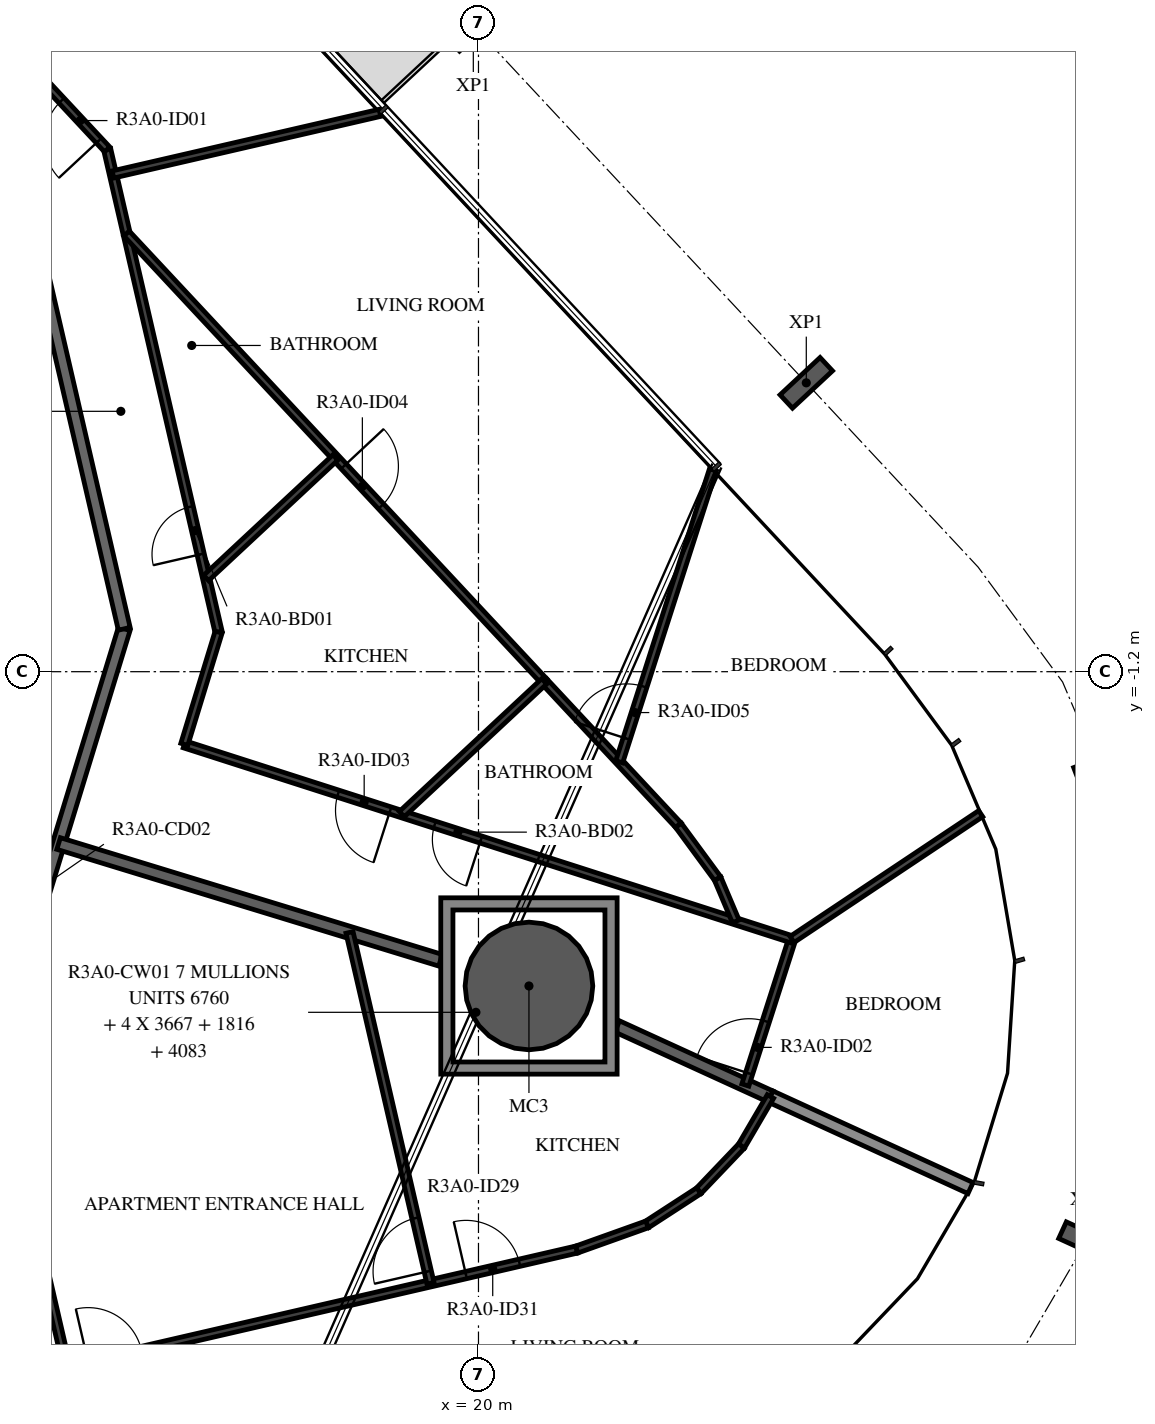
"""IFC4 building model, lengths in metres.
Left out: names, types, materials, properties, quantities, classifications, styles, units other than length and angle.
Written with IfcOpenShell. Run it as: python <this file> out.ifc"""

import sys

from ifc_helpers import new_model, si_unit, direction, frame, frame_2d, origin, origin_2d, place, context, subcontext, project, spatial, polyline, rectangle, hollow_circle, i_section, outline, extrude, element, fill, save


model = new_model("IFC4")
c1 = context("Model", 3, precision=1e-05, world=origin(), true_north=direction((0.0, 1.0)))
c2 = subcontext(c1, "Body", "Model", "MODEL_VIEW")
j1 = project(units=[si_unit("LENGTHUNIT", "METRE"), si_unit("PLANEANGLEUNIT", "RADIAN")], contexts=[c1])
p1 = place(None, origin())
s1 = spatial("IfcSite", under=j1, at=p1, CompositionType="ELEMENT")
p2 = place(p1, origin())
s2 = spatial("IfcBuilding", under=s1, at=p2, CompositionType="ELEMENT")
p3 = place(p2, frame((0.0, 0.0, 120.4)))
s3 = spatial("IfcBuildingStorey", under=s2, at=p3, CompositionType="ELEMENT", Elevation=120.4)
p4 = place(p3, frame((20.83, -6.368, -0.38), z_axis=(0.0, 0.0, 1.0), x_axis=(1.0, 0.0, 0.0)))
e1 = element("IfcColumn", 1, at=p4, inside=s3, PredefinedType="COLUMN", context=c2, shape_type="SweptSolid", body=[
    extrude(hollow_circle(Radius=1.05, WallThickness=0.05, at=origin_2d()), origin(), (0.0, 0.0, 1.0), 3.5),
])
for number, where, z_axis, x_axis in (
    (2, (30.014, -10.571, -0.38), (0.0, 0.0, 1.0), (-0.416, -0.909, 0.0)),
    (3, (30.262, -2.756, -0.38), (0.0, 0.0, 1.0), (0.358, -0.934, 0.0)),
    (4, (25.391, 3.55, -0.38), (0.0, 0.0, 1.0), (0.682, -0.731, 0.0)),
):
    element("IfcColumn", number, at=place(p3, frame(where, z_axis=z_axis, x_axis=x_axis)), inside=s3, PredefinedType="COLUMN", context=c2, shape_type="SweptSolid", body=[
        extrude(i_section(OverallWidth=0.3, OverallDepth=0.9, WebThickness=0.019, FlangeThickness=0.035, FilletRadius=0.03, at=origin_2d()), origin(), (0.0, 0.0, 1.0), 3.5),
    ])
p5 = place(p3, frame((12.028, -7.516, 0.0), z_axis=(0.0, 0.0, 1.0), x_axis=(0.292365533182, 0.956306642771, 0.0)))
e5 = element("IfcWall", 5, at=p5, inside=s3, PredefinedType="STANDARD", context=c2, shape_type="SweptSolid", body=[
    extrude(rectangle(XDim=7.342, YDim=0.2, at=frame_2d((3.671, 0.0))), origin(), (0.0, 0.0, 1.0), 3.12),
])
p6 = place(p3, frame((14.175, -0.495, 0.0), z_axis=(0.0, 0.0, 1.0), x_axis=(-0.224922649383, 0.974376622151, 0.0)))
e6 = element("IfcWall", 6, at=p6, inside=s3, PredefinedType="STANDARD", context=c2, shape_type="SweptSolid", body=[
    extrude(rectangle(XDim=7.342, YDim=0.2, at=frame_2d((3.671, 0.0))), origin(), (0.0, 0.0, 1.0), 3.12),
])
p7 = place(p3, frame((13.095, -4.026, 0.0), z_axis=(0.0, 0.0, 1.0), x_axis=(0.956303942966, -0.292374363904, 0.0)))
e7 = element("IfcWall", 7, at=p7, inside=s3, PredefinedType="STANDARD", context=c2, shape_type="SweptSolid", body=[
    extrude(rectangle(XDim=6.567, YDim=0.2, at=frame_2d((3.284, 0.0))), origin(), (0.0, 0.0, 1.0), 3.12),
])
p8 = place(p3, frame((22.28, -7.033, 0.0), z_axis=(0.0, 0.0, 1.0), x_axis=(0.909468768003, -0.415772245378, 0.0)))
e8 = element("IfcWall", 8, at=p8, inside=s3, PredefinedType="STANDARD", context=c2, shape_type="SweptSolid", body=[
    extrude(rectangle(XDim=2.773, YDim=0.2, at=frame_2d((1.386, 0.0))), origin(), (0.0, 0.0, 1.0), 3.12),
])
p9 = place(p3, frame((24.802, -8.186, 0.0), z_axis=(0.0, 0.0, 1.0), x_axis=(0.909307466213, -0.416124899387, 0.0)))
e9 = element("IfcWall", 9, at=p9, inside=s3, PredefinedType="STANDARD", context=c2, shape_type="SweptSolid", body=[
    extrude(rectangle(XDim=3.618, YDim=0.2, at=frame_2d((1.809, 0.0))), origin(), (0.0, 0.0, 1.0), 2.73),
])
p10 = place(p3, frame((15.727, -0.549, 0.0), z_axis=(0.0, 0.0, 1.0), x_axis=(-0.22493611855, 0.974373512864, 0.0)))
e10 = element("IfcWall", 10, at=p10, inside=s3, PredefinedType="PARTITIONING", context=c2, shape_type="SweptSolid", body=[
    extrude(rectangle(XDim=8.146, YDim=0.12, at=frame_2d((4.073, 0.0))), origin(), (0.0, 0.0, 1.0), 3.12),
])
p11 = place(p10, frame((1.314, 0.0, 0.0)))
e11 = element("IfcOpeningElement", 11, at=p11, cuts=e10, PredefinedType="OPENING", context=c2, shape_type="SweptSolid", body=[
    extrude(rectangle(XDim=0.8, YDim=2.1, at=frame_2d((0.4, 1.05))), frame((0.0, 0.07, 0.0), z_axis=(0.0, -1.0, 0.0), x_axis=(1.0, 0.0, 0.0)), (0.0, 0.0, 1.0), 0.14),
])
p12 = place(p3, frame((13.894, 7.388, 0.0), z_axis=(0.0, 0.0, 1.0), x_axis=(-0.681994622729, 0.731357186721, 0.0)))
e12 = element("IfcWall", 12, at=p12, inside=s3, PredefinedType="PARTITIONING", context=c2, shape_type="SweptSolid", body=[
    extrude(rectangle(XDim=8.146, YDim=0.12, at=frame_2d((4.073, 0.0))), origin(), (0.0, 0.0, 1.0), 3.12),
])
p13 = place(p12, frame((0.2, 0.0, 0.0)))
e13 = element("IfcOpeningElement", 13, at=p13, cuts=e12, PredefinedType="OPENING", context=c2, shape_type="SweptSolid", body=[
    extrude(rectangle(XDim=0.9, YDim=2.1, at=frame_2d((0.45, 1.05))), frame((0.0, 0.07, 0.0), z_axis=(0.0, -1.0, 0.0), x_axis=(1.0, 0.0, 0.0)), (0.0, 0.0, 1.0), 0.14),
])
p14 = place(p3, frame((24.389, -7.997, 0.0), z_axis=(0.0, 0.0, 1.0), x_axis=(0.305723184389, 0.952120441188, 0.0)))
e14 = element("IfcWall", 14, at=p14, inside=s3, PredefinedType="PARTITIONING", context=c2, shape_type="SweptSolid", body=[
    extrude(rectangle(XDim=2.515, YDim=0.12, at=frame_2d((1.257, 0.0))), origin(), (0.0, 0.0, 1.0), 3.12),
])
p15 = place(p14, frame((0.2, 0.0, 0.0)))
e15 = element("IfcOpeningElement", 15, at=p15, cuts=e14, PredefinedType="OPENING", context=c2, shape_type="SweptSolid", body=[
    extrude(rectangle(XDim=0.9, YDim=2.1, at=frame_2d((0.45, 1.05))), frame((0.0, 0.07, 0.0), z_axis=(0.0, -1.0, 0.0), x_axis=(1.0, 0.0, 0.0)), (0.0, 0.0, 1.0), 0.14),
])
p16 = place(p3, frame((25.158, -5.603, 0.0), z_axis=(0.0, 0.0, 1.0), x_axis=(-0.952147783118, 0.305638019729, 0.0)))
e16 = element("IfcWall", 16, at=p16, inside=s3, PredefinedType="PARTITIONING", context=c2, shape_type="SweptSolid", body=[
    extrude(rectangle(XDim=10.498, YDim=0.12, at=frame_2d((5.249, 0.0))), origin(), (0.0, 0.0, 1.0), 3.12),
])
p17 = place(p16, frame((5.373, 0.0, 0.0)))
e17 = element("IfcOpeningElement", 17, at=p17, cuts=e16, PredefinedType="OPENING", context=c2, shape_type="SweptSolid", body=[
    extrude(rectangle(XDim=0.8, YDim=2.1, at=frame_2d((0.4, 1.05))), frame((0.0, 0.07, 0.0), z_axis=(0.0, -1.0, 0.0), x_axis=(1.0, 0.0, 0.0)), (0.0, 0.0, 1.0), 0.14),
])
p18 = place(p16, frame((6.941, 0.0, 0.0)))
e18 = element("IfcOpeningElement", 18, at=p18, cuts=e16, PredefinedType="OPENING", context=c2, shape_type="SweptSolid", body=[
    extrude(rectangle(XDim=0.9, YDim=2.1, at=frame_2d((0.45, 1.05))), frame((0.0, 0.07, 0.0), z_axis=(0.0, -1.0, 0.0), x_axis=(1.0, 0.0, 0.0)), (0.0, 0.0, 1.0), 0.14),
])
p19 = place(p3, frame((15.162, -2.395, 0.0), z_axis=(0.0, 0.0, 1.0), x_axis=(0.292404972776, 0.956294584266, 0.0)))
e19 = element("IfcWall", 19, at=p19, inside=s3, PredefinedType="PARTITIONING", context=c2, shape_type="SweptSolid", body=[
    extrude(rectangle(XDim=1.929, YDim=0.12, at=frame_2d((0.965, 0.0))), origin(), (0.0, 0.0, 1.0), 3.12),
])
p20 = place(p3, frame((14.213, 6.006, 0.0), z_axis=(0.0, 0.0, 1.0), x_axis=(0.681982148724, -0.731368818601, 0.0)))
e20 = element("IfcWall", 20, at=p20, inside=s3, PredefinedType="PARTITIONING", context=c2, shape_type="SweptSolid", body=[
    extrude(rectangle(XDim=10.07, YDim=0.12, at=frame_2d((5.035, 0.0))), origin(), (0.0, 0.0, 1.0), 3.12),
])
p21 = place(p20, frame((5.235, 0.0, 0.0)))
e21 = element("IfcOpeningElement", 21, at=p21, cuts=e20, PredefinedType="OPENING", context=c2, shape_type="SweptSolid", body=[
    extrude(rectangle(XDim=0.9, YDim=2.1, at=frame_2d((0.45, 1.05))), frame((0.0, 0.07, 0.0), z_axis=(0.0, -1.0, 0.0), x_axis=(1.0, 0.0, 0.0)), (0.0, 0.0, 1.0), 0.14),
])
p22 = place(p3, frame((18.379, 7.99, 0.0), z_axis=(0.0, 0.0, 1.0), x_axis=(-0.974372926515, -0.224938658471, 0.0)))
e22 = element("IfcWall", 22, at=p22, inside=s3, PredefinedType="PARTITIONING", context=c2, shape_type="SweptSolid", body=[
    extrude(rectangle(XDim=4.505, YDim=0.12, at=frame_2d((2.253, 0.0))), origin(), (0.0, 0.0, 1.0), 3.12),
])
p23 = place(p3, frame((21.081, -1.359, 0.0), z_axis=(0.0, 0.0, 1.0), x_axis=(0.682046729342, -0.731308593545, 0.0)))
e23 = element("IfcWall", 23, at=p23, inside=s3, PredefinedType="PARTITIONING", context=c2, shape_type="SweptSolid", body=[
    extrude(rectangle(XDim=3.236, YDim=0.12, at=frame_2d((1.618, 0.0))), origin(), (0.0, 0.0, 1.0), 3.12),
])
p24 = place(p3, frame((22.314, -2.681, 0.0), z_axis=(0.0, 0.0, 1.0), x_axis=(0.305629733216, 0.952150443036, 0.0)))
e24 = element("IfcWall", 24, at=p24, inside=s3, PredefinedType="PARTITIONING", context=c2, shape_type="SweptSolid", body=[
    extrude(rectangle(XDim=5.041, YDim=0.12, at=frame_2d((2.52, 0.0))), origin(), (0.0, 0.0, 1.0), 3.12),
])
p25 = place(p24, frame((0.4, 0.0, 0.0)))
e25 = element("IfcOpeningElement", 25, at=p25, cuts=e24, PredefinedType="OPENING", context=c2, shape_type="SweptSolid", body=[
    extrude(rectangle(XDim=0.9, YDim=2.1, at=frame_2d((0.45, 1.05))), frame((0.0, 0.07, 0.0), z_axis=(0.0, -1.0, 0.0), x_axis=(1.0, 0.0, 0.0)), (0.0, 0.0, 1.0), 0.14),
])
p26 = place(p3, frame((15.521, 0.341, 0.0), z_axis=(0.0, 0.0, 1.0), x_axis=(0.73140706136, 0.681941134257, 0.0)))
e26 = element("IfcWall", 26, at=p26, inside=s3, PredefinedType="PARTITIONING", context=c2, shape_type="SweptSolid", body=[
    extrude(rectangle(XDim=2.907, YDim=0.12, at=frame_2d((1.454, 0.0))), origin(), (0.0, 0.0, 1.0), 3.12),
])
p27 = place(p3, frame((28.259, -3.535, 0.0), z_axis=(0.0, 0.0, 1.0), x_axis=(-0.831969683957, -0.554821092765, 0.0)))
e27 = element("IfcWall", 27, at=p27, inside=s3, PredefinedType="PARTITIONING", context=c2, shape_type="SweptSolid", body=[
    extrude(rectangle(XDim=3.728, YDim=0.12, at=frame_2d((1.864, 0.0))), origin(), (0.0, 0.0, 1.0), 2.73),
])
p28 = place(p3, frame((24.231, -5.306, 0.0), z_axis=(0.0, 0.0, 1.0), x_axis=(-0.390836600732, 0.92046007601, 0.0)))
e28 = element("IfcWall", 28, at=p28, inside=s3, PredefinedType="PARTITIONING", context=c2, shape_type="SweptSolid", body=[
    extrude(rectangle(XDim=0.765, YDim=0.12, at=frame_2d((0.383, 0.0))), origin(), (0.0, 0.0, 1.0), 3.12),
])
p29 = place(p3, frame((23.932, -4.601, 0.0), z_axis=(0.0, 0.0, 1.0), x_axis=(-0.592463335142, 0.805597415904, 0.0)))
e29 = element("IfcWall", 29, at=p29, inside=s3, PredefinedType="PARTITIONING", context=c2, shape_type="SweptSolid", body=[
    extrude(rectangle(XDim=1.087, YDim=0.12, at=frame_2d((0.543, 0.0))), origin(), (0.0, 0.0, 1.0), 3.12),
])
p30 = place(p3, frame((21.081, -1.359, 0.0), z_axis=(0.0, 0.0, 1.0), x_axis=(-0.731341711004, -0.682011218196, 0.0)))
e30 = element("IfcWall", 30, at=p30, inside=s3, PredefinedType="PARTITIONING", context=c2, shape_type="SweptSolid", body=[
    extrude(rectangle(XDim=3.202, YDim=0.12, at=frame_2d((1.601, 0.0))), origin(), (0.0, 0.0, 1.0), 3.12),
])
p31 = place(p3, frame((12.434, -9.189, 0.0), z_axis=(0.0, 0.0, 1.0), x_axis=(0.224924972887, -0.974376085796, 0.0)))
e31 = element("IfcWall", 31, at=p31, inside=s3, PredefinedType="PARTITIONING", context=c2, shape_type="SweptSolid", body=[
    extrude(rectangle(XDim=3.541, YDim=0.12, at=frame_2d((1.771, 0.0))), origin(), (0.0, 0.0, 1.0), 3.12),
])
p32 = place(p3, frame((7.312, -14.005, 0.0), z_axis=(0.0, 0.0, 1.0), x_axis=(0.974367924791, 0.224960323474, 0.0)))
e32 = element("IfcWall", 32, at=p32, inside=s3, PredefinedType="PARTITIONING", context=c2, shape_type="SweptSolid", body=[
    extrude(rectangle(XDim=14.679, YDim=0.12, at=frame_2d((7.34, 0.0))), origin(), (0.0, 0.0, 1.0), 3.12),
])
p33 = place(p32, frame((6.433, 0.0, 0.0)))
e33 = element("IfcOpeningElement", 33, at=p33, cuts=e32, PredefinedType="OPENING", context=c2, shape_type="SweptSolid", body=[
    extrude(rectangle(XDim=0.9, YDim=2.1, at=frame_2d((0.45, 1.05))), frame((0.0, 0.07, 0.0), z_axis=(0.0, -1.0, 0.0), x_axis=(1.0, 0.0, 0.0)), (0.0, 0.0, 1.0), 0.14),
])
p34 = place(p32, frame((12.812, 0.0, 0.0)))
e34 = element("IfcOpeningElement", 34, at=p34, cuts=e32, PredefinedType="OPENING", context=c2, shape_type="SweptSolid", body=[
    extrude(rectangle(XDim=0.9, YDim=2.1, at=frame_2d((0.45, 1.05))), frame((0.0, 0.07, 0.0), z_axis=(0.0, -1.0, 0.0), x_axis=(1.0, 0.0, 0.0)), (0.0, 0.0, 1.0), 0.14),
])
p35 = place(p3, frame((19.211, -11.258, 0.0), z_axis=(0.0, 0.0, 1.0), x_axis=(-0.22499500936, 0.974359915926, 0.0)))
e35 = element("IfcWall", 35, at=p35, inside=s3, PredefinedType="PARTITIONING", context=c2, shape_type="SweptSolid", body=[
    extrude(rectangle(XDim=5.921, YDim=0.12, at=frame_2d((2.961, 0.0))), origin(), (0.0, 0.0, 1.0), 3.12),
])
p36 = place(p35, frame((0.2, 0.0, 0.0)))
e36 = element("IfcOpeningElement", 36, at=p36, cuts=e35, PredefinedType="OPENING", context=c2, shape_type="SweptSolid", body=[
    extrude(rectangle(XDim=0.9, YDim=2.1, at=frame_2d((0.45, 1.05))), frame((0.0, 0.07, 0.0), z_axis=(0.0, -1.0, 0.0), x_axis=(1.0, 0.0, 0.0)), (0.0, 0.0, 1.0), 0.14),
])
p37 = place(p3, frame((24.802, -8.186, 0.0), z_axis=(0.0, 0.0, 1.0), x_axis=(-0.505043103481, -0.863094122113, 0.0)))
e37 = element("IfcWall", 37, at=p37, inside=s3, PredefinedType="PARTITIONING", context=c2, shape_type="SweptSolid", body=[
    extrude(rectangle(XDim=0.945, YDim=0.12, at=frame_2d((0.473, 0.0))), origin(), (0.0, 0.0, 1.0), 3.12),
])
for number, where, z_axis, x_axis in (
    (38, (24.324, -9.002, 0.0), (0.0, 0.0, 1.0), (-0.69, -0.723, 0.0)),
    (39, (23.623, -9.737, 0.0), (0.0, 0.0, 1.0), (-0.839, -0.545, 0.0)),
):
    element("IfcWall", number, at=place(p3, frame(where, z_axis=z_axis, x_axis=x_axis)), inside=s3, PredefinedType="PARTITIONING", context=c2, shape_type="SweptSolid", body=[
        extrude(rectangle(XDim=1.016, YDim=0.12, at=frame_2d((0.508, 0.0))), origin(), (0.0, 0.0, 1.0), 3.12),
    ])
p38 = place(p3, frame((22.771, -10.29, 0.0), z_axis=(0.0, 0.0, 1.0), x_axis=(-0.941701391526, -0.336449831623, 0.0)))
e40 = element("IfcWall", 40, at=p38, inside=s3, PredefinedType="PARTITIONING", context=c2, shape_type="SweptSolid", body=[
    extrude(rectangle(XDim=1.227, YDim=0.12, at=frame_2d((0.614, 0.0))), origin(), (0.0, 0.0, 1.0), 3.12),
])
p39 = place(p3, origin())
e41 = element("IfcWall", 41, at=p39, inside=s3, PredefinedType="STANDARD", context=c2, shape_type="SweptSolid", body=[
    extrude(outline(polyline([(22.28, -4.918), (22.28, -7.818), (19.38, -7.818), (19.38, -4.918), (22.28, -4.918)]), holes=[polyline([(19.58, -7.618), (22.08, -7.618), (22.08, -5.118), (19.58, -5.118), (19.58, -7.618)])]), origin(), (0.0, 0.0, 1.0), 3.12),
])
p40 = place(p11, origin())
e42 = element("IfcDoor", 42, at=p40, inside=s3, OperationType="SINGLE_SWING_LEFT", PredefinedType="DOOR", context=c2, shape_type="SweptSolid", body=[
    extrude(rectangle(XDim=0.8, YDim=2.1, at=frame_2d((0.4, 1.05))), frame((0.0, 0.025, 0.0), z_axis=(0.0, -1.0, 0.0), x_axis=(1.0, 0.0, 0.0)), (0.0, 0.0, 1.0), 0.05),
])
fill(e11, e42)
p41 = place(p13, origin())
e43 = element("IfcDoor", 43, at=p41, inside=s3, OperationType="SINGLE_SWING_LEFT", PredefinedType="DOOR", context=c2, shape_type="SweptSolid", body=[
    extrude(rectangle(XDim=0.9, YDim=2.1, at=frame_2d((0.45, 1.05))), frame((0.0, 0.025, 0.0), z_axis=(0.0, -1.0, 0.0), x_axis=(1.0, 0.0, 0.0)), (0.0, 0.0, 1.0), 0.05),
])
fill(e13, e43)
p42 = place(p15, origin())
e44 = element("IfcDoor", 44, at=p42, inside=s3, OperationType="SINGLE_SWING_LEFT", PredefinedType="DOOR", context=c2, shape_type="SweptSolid", body=[
    extrude(rectangle(XDim=0.9, YDim=2.1, at=frame_2d((0.45, 1.05))), frame((0.0, 0.025, 0.0), z_axis=(0.0, -1.0, 0.0), x_axis=(1.0, 0.0, 0.0)), (0.0, 0.0, 1.0), 0.05),
])
fill(e15, e44)
p43 = place(p17, origin())
e45 = element("IfcDoor", 45, at=p43, inside=s3, OperationType="SINGLE_SWING_LEFT", PredefinedType="DOOR", context=c2, shape_type="SweptSolid", body=[
    extrude(rectangle(XDim=0.8, YDim=2.1, at=frame_2d((0.4, 1.05))), frame((0.0, 0.025, 0.0), z_axis=(0.0, -1.0, 0.0), x_axis=(1.0, 0.0, 0.0)), (0.0, 0.0, 1.0), 0.05),
])
fill(e17, e45)
p44 = place(p18, origin())
e46 = element("IfcDoor", 46, at=p44, inside=s3, OperationType="SINGLE_SWING_LEFT", PredefinedType="DOOR", context=c2, shape_type="SweptSolid", body=[
    extrude(rectangle(XDim=0.9, YDim=2.1, at=frame_2d((0.45, 1.05))), frame((0.0, 0.025, 0.0), z_axis=(0.0, -1.0, 0.0), x_axis=(1.0, 0.0, 0.0)), (0.0, 0.0, 1.0), 0.05),
])
fill(e18, e46)
p45 = place(p21, origin())
e47 = element("IfcDoor", 47, at=p45, inside=s3, OperationType="SINGLE_SWING_LEFT", PredefinedType="DOOR", context=c2, shape_type="SweptSolid", body=[
    extrude(rectangle(XDim=0.9, YDim=2.1, at=frame_2d((0.45, 1.05))), frame((0.0, 0.025, 0.0), z_axis=(0.0, -1.0, 0.0), x_axis=(1.0, 0.0, 0.0)), (0.0, 0.0, 1.0), 0.05),
])
fill(e21, e47)
p46 = place(p25, origin())
e48 = element("IfcDoor", 48, at=p46, inside=s3, OperationType="SINGLE_SWING_LEFT", PredefinedType="DOOR", context=c2, shape_type="SweptSolid", body=[
    extrude(rectangle(XDim=0.9, YDim=2.1, at=frame_2d((0.45, 1.05))), frame((0.0, 0.025, 0.0), z_axis=(0.0, -1.0, 0.0), x_axis=(1.0, 0.0, 0.0)), (0.0, 0.0, 1.0), 0.05),
])
fill(e25, e48)
p47 = place(p36, origin())
e49 = element("IfcDoor", 49, at=p47, inside=s3, OperationType="SINGLE_SWING_RIGHT", PredefinedType="DOOR", context=c2, shape_type="SweptSolid", body=[
    extrude(rectangle(XDim=0.9, YDim=2.1, at=frame_2d((0.45, 1.05))), frame((0.0, 0.025, 0.0), z_axis=(0.0, -1.0, 0.0), x_axis=(1.0, 0.0, 0.0)), (0.0, 0.0, 1.0), 0.05),
])
fill(e36, e49)
p48 = place(p34, origin())
e50 = element("IfcDoor", 50, at=p48, inside=s3, OperationType="SINGLE_SWING_LEFT", PredefinedType="DOOR", context=c2, shape_type="SweptSolid", body=[
    extrude(rectangle(XDim=0.9, YDim=2.1, at=frame_2d((0.45, 1.05))), frame((0.0, 0.025, 0.0), z_axis=(0.0, -1.0, 0.0), x_axis=(1.0, 0.0, 0.0)), (0.0, 0.0, 1.0), 0.05),
])
fill(e34, e50)
save(model, sys.argv[1])
